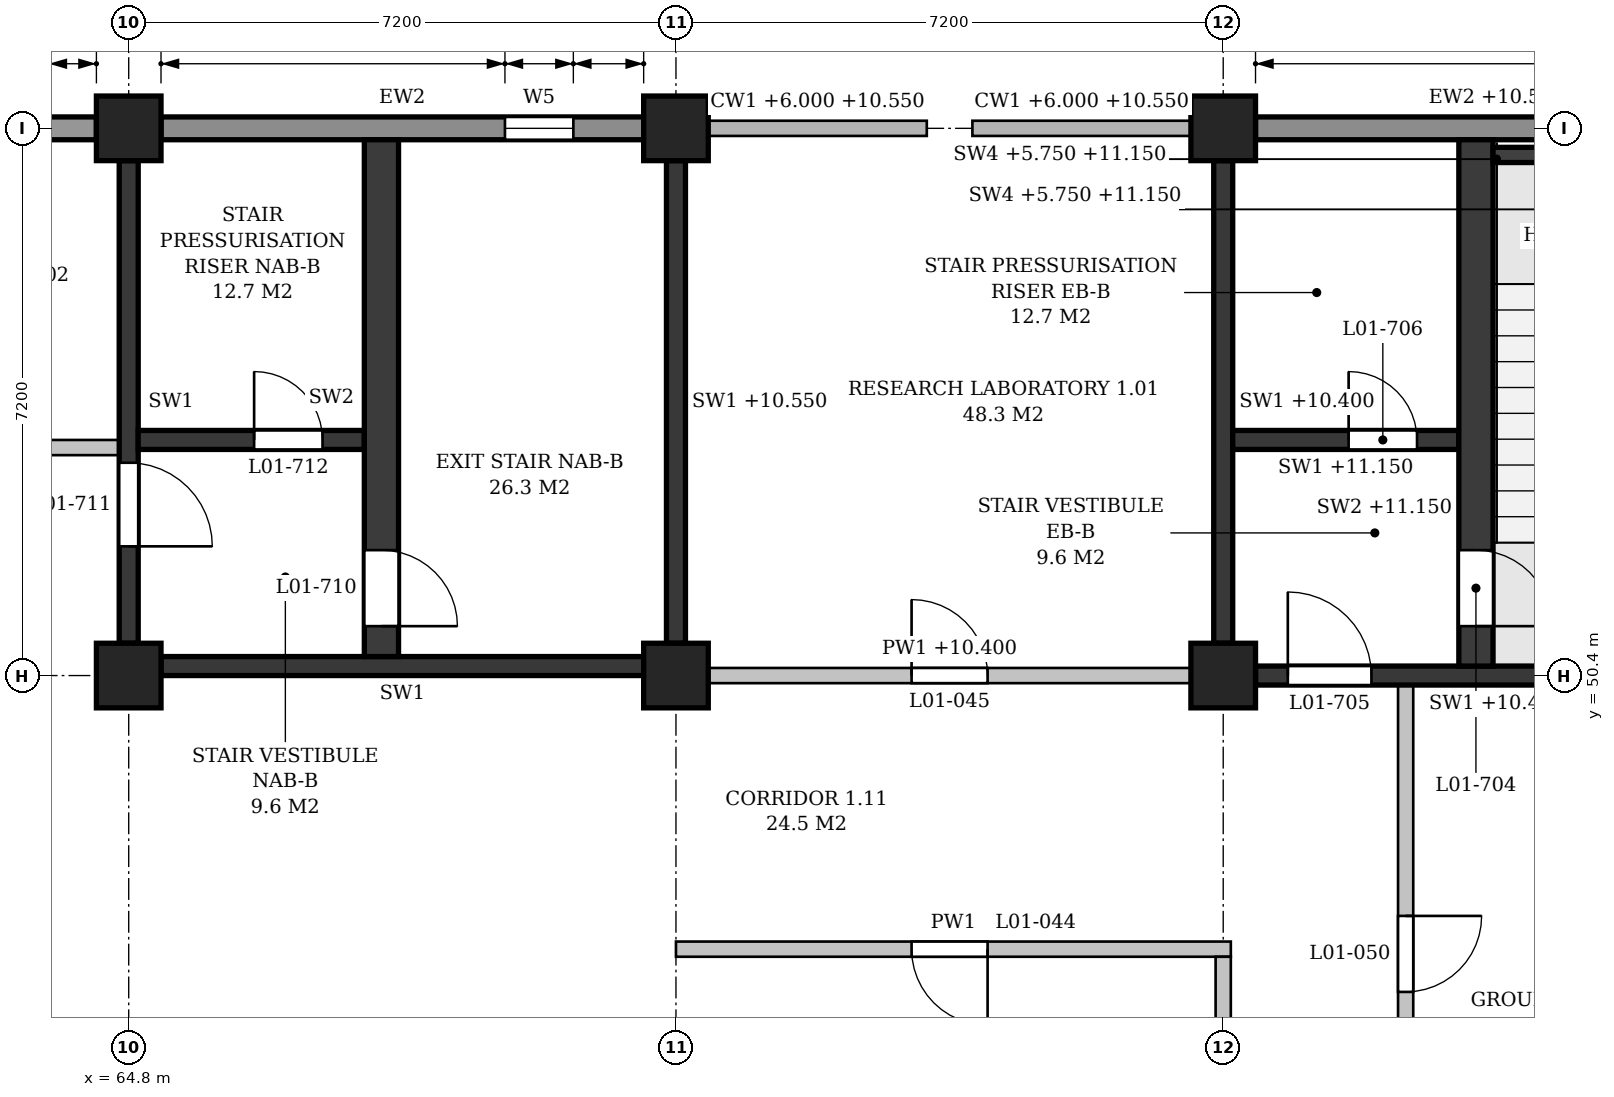
"""IFC4 building model, lengths in metres.
Left out: names, types, materials, properties, quantities, classifications, styles, units other than length and angle.
Written with IfcOpenShell. Run it as: python <this file> out.ifc"""

import sys

from ifc_helpers import new_model, si_unit, direction, frame, frame_2d, origin, origin_2d, place, context, subcontext, project, spatial, polyline, rectangle, outline, extrude, element, fill, save


model = new_model("IFC4")
c1 = context("Model", 3, precision=1e-05, world=origin(), true_north=direction((0.0, 1.0)))
c2 = subcontext(c1, "Body", "Model", "MODEL_VIEW")
j1 = project(units=[si_unit("LENGTHUNIT", "METRE"), si_unit("PLANEANGLEUNIT", "RADIAN")], contexts=[c1])
p1 = place(None, origin())
s1 = spatial("IfcSite", under=j1, at=p1, CompositionType="ELEMENT")
p2 = place(p1, origin())
s2 = spatial("IfcBuilding", under=s1, at=p2, CompositionType="ELEMENT")
p3 = place(p2, frame((0.0, 0.0, 6.0)))
s3 = spatial("IfcBuildingStorey", under=s2, at=p3, CompositionType="ELEMENT", Elevation=6.0)
for number, where, z_axis, x_axis in (
    (1, (64.8, 50.4, 0.0), (0.0, 0.0, 1.0), (1.0, 0.0, 0.0)),
    (2, (64.8, 57.6, 0.0), (0.0, 0.0, 1.0), (1.0, 0.0, 0.0)),
    (3, (72.0, 50.4, 0.0), (0.0, 0.0, 1.0), (1.0, 0.0, 0.0)),
    (4, (72.0, 57.6, 0.0), (0.0, 0.0, 1.0), (1.0, 0.0, 0.0)),
    (5, (79.2, 50.4, 0.0), (0.0, 0.0, 1.0), (1.0, 0.0, 0.0)),
    (6, (79.2, 57.6, 0.0), (0.0, 0.0, 1.0), (1.0, 0.0, 0.0)),
):
    element("IfcColumn", number, at=place(p3, frame(where, z_axis=z_axis, x_axis=x_axis)), inside=s3, PredefinedType="COLUMN", context=c2, shape_type="SweptSolid", body=[
        extrude(rectangle(XDim=0.85, YDim=0.85, at=origin_2d()), origin(), (0.0, 0.0, 1.0), 5.4),
    ])
p4 = place(p3, frame((85.975, 57.6, 0.0), z_axis=(0.0, 0.0, 1.0), x_axis=(-1.0, 0.0, 0.0)))
e7 = element("IfcWall", 7, at=p4, inside=s3, PredefinedType="STANDARD", context=c2, shape_type="SweptSolid", body=[
    extrude(rectangle(XDim=6.35, YDim=0.3, at=frame_2d((3.175, 0.0))), origin(), (0.0, 0.0, 1.0), 4.55),
])
p5 = place(p4, frame((0.925, 0.0, 0.9)))
e8 = element("IfcOpeningElement", 8, at=p5, cuts=e7, PredefinedType="OPENING", context=c2, shape_type="SweptSolid", body=[
    extrude(outline(polyline([(0.0, 0.0), (0.9, 0.0), (0.9, 3.15), (0.45, 3.6), (0.0, 3.15), (0.0, 0.0)])), frame((0.0, 0.16, 0.0), z_axis=(0.0, -1.0, 0.0), x_axis=(1.0, 0.0, 0.0)), (0.0, 0.0, 1.0), 0.32),
])
p6 = place(p3, frame((71.575, 57.6, 0.0), z_axis=(0.0, 0.0, 1.0), x_axis=(-1.0, 0.0, 0.0)))
e9 = element("IfcWall", 9, at=p6, inside=s3, PredefinedType="STANDARD", context=c2, shape_type="SweptSolid", body=[
    extrude(rectangle(XDim=6.35, YDim=0.3, at=frame_2d((3.175, 0.0))), origin(), (0.0, 0.0, 1.0), 4.7),
])
p7 = place(p6, frame((0.925, 0.0, 0.9)))
e10 = element("IfcOpeningElement", 10, at=p7, cuts=e9, PredefinedType="OPENING", context=c2, shape_type="SweptSolid", body=[
    extrude(outline(polyline([(0.0, 0.0), (0.9, 0.0), (0.9, 3.15), (0.45, 3.6), (0.0, 3.15), (0.0, 0.0)])), frame((0.0, 0.16, 0.0), z_axis=(0.0, -1.0, 0.0), x_axis=(1.0, 0.0, 0.0)), (0.0, 0.0, 1.0), 0.32),
])
p8 = place(p3, frame((64.375, 57.6, 0.0), z_axis=(0.0, 0.0, 1.0), x_axis=(-1.0, 0.0, 0.0)))
e11 = element("IfcWall", 11, at=p8, inside=s3, PredefinedType="STANDARD", context=c2, shape_type="SweptSolid", body=[
    extrude(rectangle(XDim=6.35, YDim=0.3, at=frame_2d((3.175, 0.0))), origin(), (0.0, 0.0, 1.0), 4.7),
])
p9 = place(p8, frame((0.625, 0.0, 0.9)))
e12 = element("IfcOpeningElement", 12, at=p9, cuts=e11, PredefinedType="OPENING", context=c2, shape_type="SweptSolid", body=[
    extrude(outline(polyline([(0.0, 0.0), (1.5, 0.0), (1.5, 2.85), (0.75, 3.6), (0.0, 2.85), (0.0, 0.0)])), frame((0.0, 0.16, 0.0), z_axis=(0.0, -1.0, 0.0), x_axis=(1.0, 0.0, 0.0)), (0.0, 0.0, 1.0), 0.32),
])
p10 = place(p8, frame((4.225, 0.0, 0.9)))
e13 = element("IfcOpeningElement", 13, at=p10, cuts=e11, PredefinedType="OPENING", context=c2, shape_type="SweptSolid", body=[
    extrude(outline(polyline([(0.0, 0.0), (1.5, 0.0), (1.5, 2.85), (0.75, 3.6), (0.0, 2.85), (0.0, 0.0)])), frame((0.0, 0.16, 0.0), z_axis=(0.0, -1.0, 0.0), x_axis=(1.0, 0.0, 0.0)), (0.0, 0.0, 1.0), 0.32),
])
p11 = place(p3, frame((79.625, 50.4, 0.0), z_axis=(0.0, 0.0, 1.0), x_axis=(1.0, 0.0, 0.0)))
e14 = element("IfcWall", 14, at=p11, inside=s3, PredefinedType="SHEAR", context=c2, shape_type="SweptSolid", body=[
    extrude(rectangle(XDim=6.35, YDim=0.25, at=frame_2d((3.175, 0.0))), origin(), (0.0, 0.0, 1.0), 4.4),
])
p12 = place(p11, frame((0.425, 0.0, 0.0)))
e15 = element("IfcOpeningElement", 15, at=p12, cuts=e14, PredefinedType="OPENING", context=c2, shape_type="SweptSolid", body=[
    extrude(rectangle(XDim=1.1, YDim=2.1, at=frame_2d((0.55, 1.05))), frame((0.0, 0.135, 0.0), z_axis=(0.0, -1.0, 0.0), x_axis=(1.0, 0.0, 0.0)), (0.0, 0.0, 1.0), 0.27),
])
p13 = place(p3, frame((79.2, 50.825, 0.0), z_axis=(0.0, 0.0, 1.0), x_axis=(0.0, 1.0, 0.0)))
e16 = element("IfcWall", 16, at=p13, inside=s3, PredefinedType="SHEAR", context=c2, shape_type="SweptSolid", body=[
    extrude(rectangle(XDim=6.35, YDim=0.25, at=frame_2d((3.175, 0.0))), origin(), (0.0, 0.0, 1.0), 4.4),
])
p14 = place(p3, frame((82.75, 57.25, -0.25), z_axis=(0.0, 0.0, 1.0), x_axis=(1.0, 0.0, 0.0)))
e17 = element("IfcWall", 17, at=p14, inside=s3, PredefinedType="SHEAR", context=c2, shape_type="SweptSolid", body=[
    extrude(rectangle(XDim=1.4, YDim=0.2, at=frame_2d((0.7, 0.0))), origin(), (0.0, 0.0, 1.0), 5.4),
])
p15 = place(p3, frame((82.525, 50.525, 0.0), z_axis=(0.0, 0.0, 1.0), x_axis=(0.0, 1.0, 0.0)))
e18 = element("IfcWall", 18, at=p15, inside=s3, PredefinedType="SHEAR", context=c2, shape_type="SweptSolid", body=[
    extrude(rectangle(XDim=6.925, YDim=0.45, at=frame_2d((3.462, 0.0))), origin(), (0.0, 0.0, 1.0), 5.15),
])
p16 = place(p15, frame((0.525, 0.0, 0.0)))
e19 = element("IfcOpeningElement", 19, at=p16, cuts=e18, PredefinedType="OPENING", context=c2, shape_type="SweptSolid", body=[
    extrude(rectangle(XDim=1.0, YDim=2.1, at=frame_2d((0.5, 1.05))), frame((0.0, 0.235, 0.0), z_axis=(0.0, -1.0, 0.0), x_axis=(1.0, 0.0, 0.0)), (0.0, 0.0, 1.0), 0.47),
])
p17 = place(p3, frame((79.325, 53.5, 0.0), z_axis=(0.0, 0.0, 1.0), x_axis=(1.0, 0.0, 0.0)))
e20 = element("IfcWall", 20, at=p17, inside=s3, PredefinedType="SHEAR", context=c2, shape_type="SweptSolid", body=[
    extrude(rectangle(XDim=2.975, YDim=0.25, at=frame_2d((1.488, 0.0))), origin(), (0.0, 0.0, 1.0), 5.15),
])
p18 = place(p17, frame((1.525, 0.0, 0.0)))
e21 = element("IfcOpeningElement", 21, at=p18, cuts=e20, PredefinedType="OPENING", context=c2, shape_type="SweptSolid", body=[
    extrude(rectangle(XDim=0.9, YDim=2.1, at=frame_2d((0.45, 1.05))), frame((0.0, 0.135, 0.0), z_axis=(0.0, -1.0, 0.0), x_axis=(1.0, 0.0, 0.0)), (0.0, 0.0, 1.0), 0.27),
])
p19 = place(p3, frame((65.225, 50.525, 0.0), z_axis=(0.0, 0.0, 1.0), x_axis=(1.0, 0.0, 0.0)))
e22 = element("IfcWall", 22, at=p19, inside=s3, PredefinedType="SHEAR", context=c2, shape_type="SweptSolid", body=[
    extrude(rectangle(XDim=6.35, YDim=0.25, at=frame_2d((3.175, 0.0))), origin(), (0.0, 0.0, 1.0), 4.7),
])
p20 = place(p3, frame((72.0, 50.825, 0.0), z_axis=(0.0, 0.0, 1.0), x_axis=(0.0, 1.0, 0.0)))
e23 = element("IfcWall", 23, at=p20, inside=s3, PredefinedType="SHEAR", context=c2, shape_type="SweptSolid", body=[
    extrude(rectangle(XDim=6.35, YDim=0.25, at=frame_2d((3.175, 0.0))), origin(), (0.0, 0.0, 1.0), 4.55),
])
p21 = place(p3, frame((64.8, 50.825, 0.0), z_axis=(0.0, 0.0, 1.0), x_axis=(0.0, 1.0, 0.0)))
e24 = element("IfcWall", 24, at=p21, inside=s3, PredefinedType="SHEAR", context=c2, shape_type="SweptSolid", body=[
    extrude(rectangle(XDim=6.35, YDim=0.25, at=frame_2d((3.175, 0.0))), origin(), (0.0, 0.0, 1.0), 4.7),
])
p22 = place(p21, frame((1.275, 0.0, 0.0)))
e25 = element("IfcOpeningElement", 25, at=p22, cuts=e24, PredefinedType="OPENING", context=c2, shape_type="SweptSolid", body=[
    extrude(rectangle(XDim=1.1, YDim=2.1, at=frame_2d((0.55, 1.05))), frame((0.0, 0.135, 0.0), z_axis=(0.0, -1.0, 0.0), x_axis=(1.0, 0.0, 0.0)), (0.0, 0.0, 1.0), 0.27),
])
p23 = place(p3, frame((68.125, 50.65, 0.0), z_axis=(0.0, 0.0, 1.0), x_axis=(0.0, 1.0, 0.0)))
e26 = element("IfcWall", 26, at=p23, inside=s3, PredefinedType="SHEAR", context=c2, shape_type="SweptSolid", body=[
    extrude(rectangle(XDim=6.8, YDim=0.45, at=frame_2d((3.4, 0.0))), origin(), (0.0, 0.0, 1.0), 4.7),
])
p24 = place(p23, frame((0.4, 0.0, 0.0)))
e27 = element("IfcOpeningElement", 27, at=p24, cuts=e26, PredefinedType="OPENING", context=c2, shape_type="SweptSolid", body=[
    extrude(rectangle(XDim=1.0, YDim=2.1, at=frame_2d((0.5, 1.05))), frame((0.0, 0.235, 0.0), z_axis=(0.0, -1.0, 0.0), x_axis=(1.0, 0.0, 0.0)), (0.0, 0.0, 1.0), 0.47),
])
p25 = place(p3, frame((64.925, 53.5, 0.0), z_axis=(0.0, 0.0, 1.0), x_axis=(1.0, 0.0, 0.0)))
e28 = element("IfcWall", 28, at=p25, inside=s3, PredefinedType="SHEAR", context=c2, shape_type="SweptSolid", body=[
    extrude(rectangle(XDim=2.975, YDim=0.25, at=frame_2d((1.487, 0.0))), origin(), (0.0, 0.0, 1.0), 4.7),
])
p26 = place(p25, frame((1.525, 0.0, 0.0)))
e29 = element("IfcOpeningElement", 29, at=p26, cuts=e28, PredefinedType="OPENING", context=c2, shape_type="SweptSolid", body=[
    extrude(rectangle(XDim=0.9, YDim=2.1, at=frame_2d((0.45, 1.05))), frame((0.0, 0.135, 0.0), z_axis=(0.0, -1.0, 0.0), x_axis=(1.0, 0.0, 0.0)), (0.0, 0.0, 1.0), 0.27),
])
p27 = place(p2, origin())
s4 = spatial("IfcBuildingStorey", under=s2, at=p27, CompositionType="ELEMENT", Elevation=0.0)
p28 = place(p27, frame((58.025, 50.2, 0.0), z_axis=(0.0, 0.0, 1.0), x_axis=(1.0, 0.0, 0.0)))
e30 = element("IfcWall", 30, at=p28, inside=s4, PredefinedType="SOLIDWALL", context=c2, shape_type="SweptSolid", body=[
    extrude(rectangle(XDim=6.35, YDim=0.4, at=frame_2d((3.175, 0.0))), origin(), (0.0, 0.0, 1.0), 10.7),
])
p29 = place(p28, frame((2.575, 0.0, 0.0)))
e31 = element("IfcOpeningElement", 31, at=p29, cuts=e30, PredefinedType="OPENING", context=c2, shape_type="SweptSolid", body=[
    extrude(rectangle(XDim=1.2, YDim=2.1, at=frame_2d((0.6, 1.05))), frame((0.0, 0.21, 0.0), z_axis=(0.0, -1.0, 0.0), x_axis=(1.0, 0.0, 0.0)), (0.0, 0.0, 1.0), 0.42),
])
p30 = place(p27, frame((65.225, 50.2, 0.0), z_axis=(0.0, 0.0, 1.0), x_axis=(1.0, 0.0, 0.0)))
e32 = element("IfcWall", 32, at=p30, inside=s4, PredefinedType="SOLIDWALL", context=c2, shape_type="SweptSolid", body=[
    extrude(rectangle(XDim=6.35, YDim=0.4, at=frame_2d((3.175, 0.0))), origin(), (0.0, 0.0, 1.0), 10.7),
])
p31 = place(p27, frame((71.8, 43.625, 0.0), z_axis=(0.0, 0.0, 1.0), x_axis=(0.0, 1.0, 0.0)))
e33 = element("IfcWall", 33, at=p31, inside=s4, PredefinedType="SOLIDWALL", context=c2, shape_type="SweptSolid", body=[
    extrude(rectangle(XDim=6.35, YDim=0.4, at=frame_2d((3.175, 0.0))), origin(), (0.0, 0.0, 1.0), 10.55),
])
p32 = place(p3, frame((72.0, 46.8, 0.0), z_axis=(0.0, 0.0, 1.0), x_axis=(1.0, 0.0, 0.0)))
e34 = element("IfcWall", 34, at=p32, inside=s3, PredefinedType="PARTITIONING", context=c2, shape_type="SweptSolid", body=[
    extrude(outline(polyline([(0.0, 0.0), (7.3, 0.0), (7.3, 4.4), (6.95, 4.4), (6.95, 4.7), (0.25, 4.7), (0.25, 4.55), (0.0, 4.55), (0.0, 0.0)])), frame((0.0, 0.1, 0.0), z_axis=(0.0, -1.0, 0.0), x_axis=(1.0, 0.0, 0.0)), (0.0, 0.0, 1.0), 0.2),
])
p33 = place(p32, frame((3.1, 0.0, 0.0)))
e35 = element("IfcOpeningElement", 35, at=p33, cuts=e34, PredefinedType="OPENING", context=c2, shape_type="SweptSolid", body=[
    extrude(rectangle(XDim=1.0, YDim=2.1, at=frame_2d((0.5, 1.05))), frame((0.0, 0.11, 0.0), z_axis=(0.0, -1.0, 0.0), x_axis=(1.0, 0.0, 0.0)), (0.0, 0.0, 1.0), 0.22),
])
p34 = place(p3, frame((72.425, 50.4, 0.0), z_axis=(0.0, 0.0, 1.0), x_axis=(1.0, 0.0, 0.0)))
e36 = element("IfcWall", 36, at=p34, inside=s3, PredefinedType="PARTITIONING", context=c2, shape_type="SweptSolid", body=[
    extrude(rectangle(XDim=6.35, YDim=0.2, at=frame_2d((3.175, 0.0))), origin(), (0.0, 0.0, 1.0), 4.4),
])
p35 = place(p34, frame((2.675, 0.0, 0.0)))
e37 = element("IfcOpeningElement", 37, at=p35, cuts=e36, PredefinedType="OPENING", context=c2, shape_type="SweptSolid", body=[
    extrude(rectangle(XDim=1.0, YDim=2.1, at=frame_2d((0.5, 1.05))), frame((0.0, 0.11, 0.0), z_axis=(0.0, -1.0, 0.0), x_axis=(1.0, 0.0, 0.0)), (0.0, 0.0, 1.0), 0.22),
])
p36 = place(p3, frame((57.6, 53.4, 0.0), z_axis=(0.0, 0.0, 1.0), x_axis=(1.0, 0.0, 0.0)))
e38 = element("IfcWall", 38, at=p36, inside=s3, PredefinedType="PARTITIONING", context=c2, shape_type="SweptSolid", body=[
    extrude(rectangle(XDim=7.075, YDim=0.2, at=frame_2d((3.538, 0.0))), origin(), (0.0, 0.0, 1.0), 4.7),
])
p37 = place(p3, frame((79.2, 43.625, 0.0), z_axis=(0.0, 0.0, 1.0), x_axis=(0.0, 1.0, 0.0)))
e39 = element("IfcWall", 39, at=p37, inside=s3, PredefinedType="PARTITIONING", context=c2, shape_type="SweptSolid", body=[
    extrude(rectangle(XDim=3.075, YDim=0.2, at=frame_2d((1.538, 0.0))), origin(), (0.0, 0.0, 1.0), 4.4),
])
p38 = place(p3, frame((81.6, 43.2, 0.0), z_axis=(0.0, 0.0, 1.0), x_axis=(0.0, 1.0, 0.0)))
e40 = element("IfcWall", 40, at=p38, inside=s3, PredefinedType="PARTITIONING", context=c2, shape_type="SweptSolid", body=[
    extrude(outline(polyline([(0.0, 0.0), (7.075, 0.0), (7.075, 4.4), (6.95, 4.4), (6.95, 5.15), (0.25, 5.15), (0.25, 4.4), (0.0, 4.4), (0.0, 0.0)])), frame((0.0, 0.1, 0.0), z_axis=(0.0, -1.0, 0.0), x_axis=(1.0, 0.0, 0.0)), (0.0, 0.0, 1.0), 0.2),
])
p39 = place(p38, frame((3.038, 0.0, 0.0)))
e41 = element("IfcOpeningElement", 41, at=p39, cuts=e40, PredefinedType="OPENING", context=c2, shape_type="SweptSolid", body=[
    extrude(rectangle(XDim=1.0, YDim=2.1, at=frame_2d((0.5, 1.05))), frame((0.0, 0.11, 0.0), z_axis=(0.0, -1.0, 0.0), x_axis=(1.0, 0.0, 0.0)), (0.0, 0.0, 1.0), 0.22),
])
p40 = place(p7, origin())
e42 = element("IfcWindow", 42, at=p40, inside=s3, PartitioningType="SINGLE_PANEL", PredefinedType="WINDOW", context=c2, shape_type="SweptSolid", body=[
    extrude(outline(polyline([(0.0, 0.0), (0.9, 0.0), (0.9, 3.15), (0.45, 3.6), (0.0, 3.15), (0.0, 0.0)])), frame((0.0, 0.03, 0.0), z_axis=(0.0, -1.0, 0.0), x_axis=(1.0, 0.0, 0.0)), (0.0, 0.0, 1.0), 0.06),
])
fill(e10, e42)
p41 = place(p16, frame((1.0, 0.0, 0.0), z_axis=(0.0, 0.0, 1.0), x_axis=(-1.0, 0.0, 0.0)))
e43 = element("IfcDoor", 43, at=p41, inside=s3, OperationType="SINGLE_SWING_RIGHT", PredefinedType="DOOR", context=c2, shape_type="SweptSolid", body=[
    extrude(rectangle(XDim=1.0, YDim=2.1, at=frame_2d((0.5, 1.05))), frame((0.0, 0.025, 0.0), z_axis=(0.0, -1.0, 0.0), x_axis=(1.0, 0.0, 0.0)), (0.0, 0.0, 1.0), 0.05),
])
fill(e19, e43)
p42 = place(p12, origin())
e44 = element("IfcDoor", 44, at=p42, inside=s3, OperationType="SINGLE_SWING_LEFT", PredefinedType="DOOR", context=c2, shape_type="SweptSolid", body=[
    extrude(rectangle(XDim=1.1, YDim=2.1, at=frame_2d((0.55, 1.05))), frame((0.0, 0.025, 0.0), z_axis=(0.0, -1.0, 0.0), x_axis=(1.0, 0.0, 0.0)), (0.0, 0.0, 1.0), 0.05),
])
fill(e15, e44)
p43 = place(p18, origin())
e45 = element("IfcDoor", 45, at=p43, inside=s3, OperationType="SINGLE_SWING_LEFT", PredefinedType="DOOR", context=c2, shape_type="SweptSolid", body=[
    extrude(rectangle(XDim=0.9, YDim=2.1, at=frame_2d((0.45, 1.05))), frame((0.0, 0.025, 0.0), z_axis=(0.0, -1.0, 0.0), x_axis=(1.0, 0.0, 0.0)), (0.0, 0.0, 1.0), 0.05),
])
fill(e21, e45)
p44 = place(p24, frame((1.0, 0.0, 0.0), z_axis=(0.0, 0.0, 1.0), x_axis=(-1.0, 0.0, 0.0)))
e46 = element("IfcDoor", 46, at=p44, inside=s3, OperationType="SINGLE_SWING_RIGHT", PredefinedType="DOOR", context=c2, shape_type="SweptSolid", body=[
    extrude(rectangle(XDim=1.0, YDim=2.1, at=frame_2d((0.5, 1.05))), frame((0.0, 0.025, 0.0), z_axis=(0.0, -1.0, 0.0), x_axis=(1.0, 0.0, 0.0)), (0.0, 0.0, 1.0), 0.05),
])
fill(e27, e46)
p45 = place(p22, frame((1.1, 0.0, 0.0), z_axis=(0.0, 0.0, 1.0), x_axis=(-1.0, 0.0, 0.0)))
e47 = element("IfcDoor", 47, at=p45, inside=s3, OperationType="SINGLE_SWING_RIGHT", PredefinedType="DOOR", context=c2, shape_type="SweptSolid", body=[
    extrude(rectangle(XDim=1.1, YDim=2.1, at=frame_2d((0.55, 1.05))), frame((0.0, 0.025, 0.0), z_axis=(0.0, -1.0, 0.0), x_axis=(1.0, 0.0, 0.0)), (0.0, 0.0, 1.0), 0.05),
])
fill(e25, e47)
p46 = place(p26, origin())
e48 = element("IfcDoor", 48, at=p46, inside=s3, OperationType="SINGLE_SWING_LEFT", PredefinedType="DOOR", context=c2, shape_type="SweptSolid", body=[
    extrude(rectangle(XDim=0.9, YDim=2.1, at=frame_2d((0.45, 1.05))), frame((0.0, 0.025, 0.0), z_axis=(0.0, -1.0, 0.0), x_axis=(1.0, 0.0, 0.0)), (0.0, 0.0, 1.0), 0.05),
])
fill(e29, e48)
p47 = place(p33, frame((1.0, 0.0, 0.0), z_axis=(0.0, 0.0, 1.0), x_axis=(-1.0, 0.0, 0.0)))
e49 = element("IfcDoor", 49, at=p47, inside=s3, OperationType="SINGLE_SWING_LEFT", PredefinedType="DOOR", context=c2, shape_type="SweptSolid", body=[
    extrude(rectangle(XDim=1.0, YDim=2.1, at=frame_2d((0.5, 1.05))), frame((0.0, 0.025, 0.0), z_axis=(0.0, -1.0, 0.0), x_axis=(1.0, 0.0, 0.0)), (0.0, 0.0, 1.0), 0.05),
])
fill(e35, e49)
p48 = place(p35, origin())
e50 = element("IfcDoor", 50, at=p48, inside=s3, OperationType="SINGLE_SWING_LEFT", PredefinedType="DOOR", context=c2, shape_type="SweptSolid", body=[
    extrude(rectangle(XDim=1.0, YDim=2.1, at=frame_2d((0.5, 1.05))), frame((0.0, 0.025, 0.0), z_axis=(0.0, -1.0, 0.0), x_axis=(1.0, 0.0, 0.0)), (0.0, 0.0, 1.0), 0.05),
])
fill(e37, e50)
p49 = place(p39, frame((1.0, 0.0, 0.0), z_axis=(0.0, 0.0, 1.0), x_axis=(-1.0, 0.0, 0.0)))
e51 = element("IfcDoor", 51, at=p49, inside=s3, OperationType="SINGLE_SWING_LEFT", PredefinedType="DOOR", context=c2, shape_type="SweptSolid", body=[
    extrude(rectangle(XDim=1.0, YDim=2.1, at=frame_2d((0.5, 1.05))), frame((0.0, 0.025, 0.0), z_axis=(0.0, -1.0, 0.0), x_axis=(1.0, 0.0, 0.0)), (0.0, 0.0, 1.0), 0.05),
])
fill(e41, e51)
save(model, sys.argv[1])
